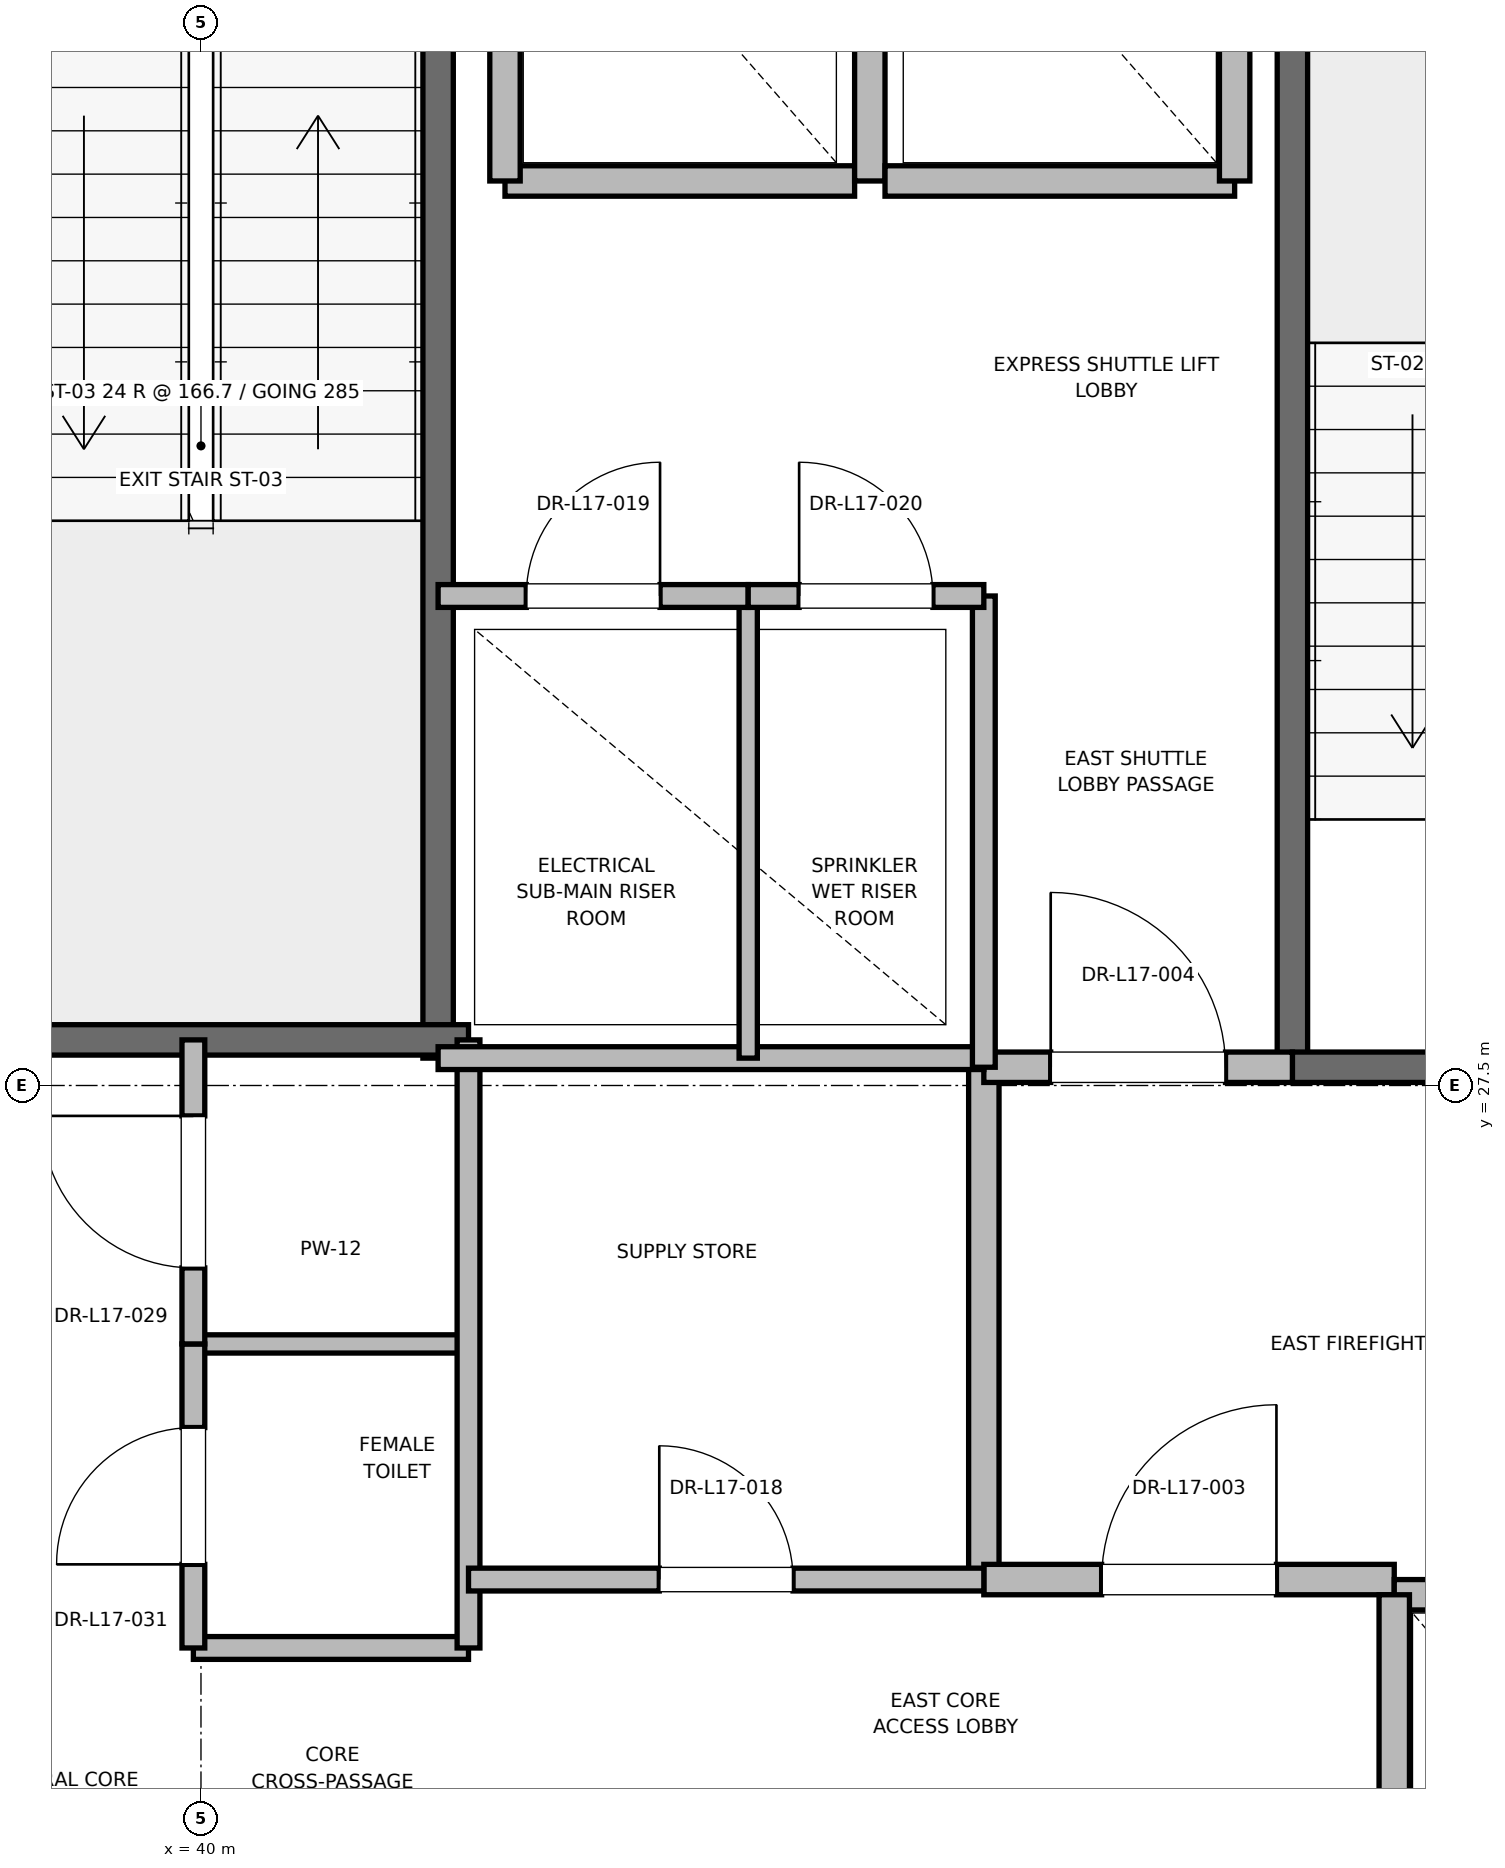
"""IFC4 building model, lengths in metres.
Left out: names, types, materials, properties, quantities, classifications, styles, units other than length and angle.
Written with IfcOpenShell. Run it as: python <this file> out.ifc"""

import sys

from ifc_helpers import new_model, si_unit, direction, frame, frame_2d, origin, place, context, subcontext, project, spatial, rectangle, extrude, element, fill, save


model = new_model("IFC4")
c1 = context("Model", 3, precision=1e-05, world=origin(), true_north=direction((0.0, 1.0)))
c2 = subcontext(c1, "Body", "Model", "MODEL_VIEW")
j1 = project(units=[si_unit("LENGTHUNIT", "METRE"), si_unit("PLANEANGLEUNIT", "RADIAN")], contexts=[c1])
p1 = place(None, origin())
s1 = spatial("IfcSite", under=j1, at=p1, CompositionType="ELEMENT")
p2 = place(p1, origin())
s2 = spatial("IfcBuilding", under=s1, at=p2, CompositionType="ELEMENT")
p3 = place(p2, frame((0.0, 0.0, 75.6)))
s3 = spatial("IfcBuildingStorey", under=s2, at=p3, CompositionType="ELEMENT", Elevation=75.6)
p4 = place(p3, frame((47.18, 27.62, 0.0), z_axis=(0.0, 0.0, 1.0), x_axis=(0.0, 1.0, 0.0)))
e1 = element("IfcWall", 1, at=p4, inside=s3, PredefinedType="SOLIDWALL", context=c2, shape_type="SweptSolid", body=[
    extrude(rectangle(XDim=8.18, YDim=0.2, at=frame_2d((4.09, 0.0))), origin(), (0.0, 0.0, 1.0), 3.76),
])
p5 = place(p3, frame((47.18, 27.62, 0.0), z_axis=(0.0, 0.0, 1.0), x_axis=(1.0, 0.0, 0.0)))
e2 = element("IfcWall", 2, at=p5, inside=s3, PredefinedType="SOLIDWALL", context=c2, shape_type="SweptSolid", body=[
    extrude(rectangle(XDim=3.12, YDim=0.2, at=frame_2d((1.56, 0.0))), origin(), (0.0, 0.0, 1.0), 3.76),
])
p6 = place(p5, frame((1.01, 0.0, 0.0)))
e3 = element("IfcOpeningElement", 3, at=p6, cuts=e2, PredefinedType="OPENING", context=c2, shape_type="SweptSolid", body=[
    extrude(rectangle(XDim=1.1, YDim=2.15, at=frame_2d((0.55, 1.075))), frame((0.0, 0.1, 0.0), z_axis=(0.0, -1.0, 0.0), x_axis=(1.0, 0.0, 0.0)), (0.0, 0.0, 1.0), 0.2),
])
p7 = place(p3, frame((41.56, 27.68, 0.0), z_axis=(0.0, 0.0, 1.0), x_axis=(0.0, 1.0, 0.0)))
e4 = element("IfcWall", 4, at=p7, inside=s3, PredefinedType="SOLIDWALL", context=c2, shape_type="SweptSolid", body=[
    extrude(rectangle(XDim=8.57, YDim=0.2, at=frame_2d((4.285, 0.0))), origin(), (0.0, 0.0, 1.0), 3.76),
])
p8 = place(p3, frame((38.44, 27.8, 0.0), z_axis=(0.0, 0.0, 1.0), x_axis=(1.0, 0.0, 0.0)))
e5 = element("IfcWall", 5, at=p8, inside=s3, PredefinedType="SOLIDWALL", context=c2, shape_type="SweptSolid", body=[
    extrude(rectangle(XDim=3.32, YDim=0.2, at=frame_2d((1.66, 0.0))), origin(), (0.0, 0.0, 1.0), 3.76),
])
p9 = place(p3, frame((45.15, 24.25, 0.0), z_axis=(0.0, 0.0, 1.0), x_axis=(0.0, 1.0, 0.0)))
e6 = element("IfcWall", 6, at=p9, inside=s3, PredefinedType="PARTITIONING", context=c2, shape_type="SweptSolid", body=[
    extrude(rectangle(XDim=3.37, YDim=0.2, at=frame_2d((1.685, 0.0))), origin(), (0.0, 0.0, 1.0), 3.76),
])
p10 = place(p3, frame((45.15, 24.25, 0.0), z_axis=(0.0, 0.0, 1.0), x_axis=(1.0, 0.0, 0.0)))
e7 = element("IfcWall", 7, at=p10, inside=s3, PredefinedType="PARTITIONING", context=c2, shape_type="SweptSolid", body=[
    extrude(rectangle(XDim=2.7, YDim=0.2, at=frame_2d((1.35, 0.0))), origin(), (0.0, 0.0, 1.0), 3.76),
])
p11 = place(p10, frame((0.775, 0.0, 0.0)))
e8 = element("IfcOpeningElement", 8, at=p11, cuts=e7, PredefinedType="OPENING", context=c2, shape_type="SweptSolid", body=[
    extrude(rectangle(XDim=1.15, YDim=2.2, at=frame_2d((0.575, 1.1))), frame((0.0, 0.1, 0.0), z_axis=(0.0, -1.0, 0.0), x_axis=(1.0, 0.0, 0.0)), (0.0, 0.0, 1.0), 0.2),
])
p12 = place(p3, frame((45.15, 27.62, 0.0), z_axis=(0.0, 0.0, 1.0), x_axis=(1.0, 0.0, 0.0)))
e9 = element("IfcWall", 9, at=p12, inside=s3, PredefinedType="PARTITIONING", context=c2, shape_type="SweptSolid", body=[
    extrude(rectangle(XDim=2.03, YDim=0.2, at=frame_2d((1.015, 0.0))), origin(), (0.0, 0.0, 1.0), 3.76),
])
p13 = place(p12, frame((0.44, 0.0, 0.0)))
e10 = element("IfcOpeningElement", 10, at=p13, cuts=e9, PredefinedType="OPENING", context=c2, shape_type="SweptSolid", body=[
    extrude(rectangle(XDim=1.15, YDim=2.2, at=frame_2d((0.575, 1.1))), frame((0.0, 0.1, 0.0), z_axis=(0.0, -1.0, 0.0), x_axis=(1.0, 0.0, 0.0)), (0.0, 0.0, 1.0), 0.2),
])
p14 = place(p3, frame((50.45, 24.15, 0.0), z_axis=(0.0, 0.0, 1.0), x_axis=(-1.0, 0.0, 0.0)))
e11 = element("IfcWall", 11, at=p14, inside=s3, PredefinedType="SOLIDWALL", context=c2, shape_type="SweptSolid", body=[
    extrude(rectangle(XDim=2.6, YDim=0.2, at=frame_2d((1.3, 0.0))), origin(), (0.0, 0.0, 1.0), 2.54),
])
p15 = place(p14, frame((0.75, 0.0, 0.0)))
e12 = element("IfcOpeningElement", 12, at=p15, cuts=e11, PredefinedType="OPENING", context=c2, shape_type="SweptSolid", body=[
    extrude(rectangle(XDim=1.1, YDim=2.2, at=frame_2d((0.55, 1.1))), frame((0.0, 0.1, 0.0), z_axis=(0.0, -1.0, 0.0), x_axis=(1.0, 0.0, 0.0)), (0.0, 0.0, 1.0), 0.2),
])
p16 = place(p3, frame((47.85, 24.15, 0.0), z_axis=(0.0, 0.0, 1.0), x_axis=(0.0, -1.0, 0.0)))
e13 = element("IfcWall", 13, at=p16, inside=s3, PredefinedType="SOLIDWALL", context=c2, shape_type="SweptSolid", body=[
    extrude(rectangle(XDim=3.0, YDim=0.2, at=frame_2d((1.5, 0.0))), origin(), (0.0, 0.0, 1.0), 3.76),
])
p17 = place(p3, frame((42.0, 33.45, 0.0), z_axis=(0.0, 0.0, 1.0), x_axis=(1.0, 0.0, 0.0)))
e14 = element("IfcWall", 14, at=p17, inside=s3, PredefinedType="SOLIDWALL", context=c2, shape_type="SweptSolid", body=[
    extrude(rectangle(XDim=2.3, YDim=0.2, at=frame_2d((1.15, 0.0))), origin(), (0.0, 0.0, 1.0), 3.76),
])
for number, where, z_axis, x_axis in (
    (15, (42.0, 36.05, 0.0), (0.0, 0.0, 1.0), (0.0, -1.0, 0.0)),
    (16, (44.4, 33.45, 0.0), (0.0, 0.0, 1.0), (0.0, 1.0, 0.0)),
):
    element("IfcWall", number, at=place(p3, frame(where, z_axis=z_axis, x_axis=x_axis)), inside=s3, PredefinedType="SOLIDWALL", context=c2, shape_type="SweptSolid", body=[
        extrude(rectangle(XDim=2.6, YDim=0.2, at=frame_2d((1.3, 0.0))), origin(), (0.0, 0.0, 1.0), 2.54),
    ])
p18 = place(p3, frame((44.5, 33.45, 0.0), z_axis=(0.0, 0.0, 1.0), x_axis=(1.0, 0.0, 0.0)))
e17 = element("IfcWall", 17, at=p18, inside=s3, PredefinedType="SOLIDWALL", context=c2, shape_type="SweptSolid", body=[
    extrude(rectangle(XDim=2.3, YDim=0.2, at=frame_2d((1.15, 0.0))), origin(), (0.0, 0.0, 1.0), 3.76),
])
p19 = place(p3, frame((46.8, 33.45, 0.0), z_axis=(0.0, 0.0, 1.0), x_axis=(0.0, 1.0, 0.0)))
e18 = element("IfcWall", 18, at=p19, inside=s3, PredefinedType="SOLIDWALL", context=c2, shape_type="SweptSolid", body=[
    extrude(rectangle(XDim=2.6, YDim=0.2, at=frame_2d((1.3, 0.0))), origin(), (0.0, 0.0, 1.0), 3.76),
])
p20 = place(p3, frame((39.95, 23.8, 0.0), z_axis=(0.0, 0.0, 1.0), x_axis=(1.0, 0.0, 0.0)))
e19 = element("IfcWall", 19, at=p20, inside=s3, PredefinedType="PARTITIONING", context=c2, shape_type="SweptSolid", body=[
    extrude(rectangle(XDim=1.81, YDim=0.15, at=frame_2d((0.905, 0.0))), origin(), (0.0, 0.0, 1.0), 2.85),
])
p21 = place(p3, frame((39.95, 25.8, 0.0), z_axis=(0.0, 0.0, 1.0), x_axis=(1.0, 0.0, 0.0)))
e20 = element("IfcWall", 20, at=p21, inside=s3, PredefinedType="PARTITIONING", context=c2, shape_type="SweptSolid", body=[
    extrude(rectangle(XDim=1.81, YDim=0.12, at=frame_2d((0.905, 0.0))), origin(), (0.0, 0.0, 1.0), 2.85),
])
p22 = place(p3, frame((41.76, 23.8, 0.0), z_axis=(0.0, 0.0, 1.0), x_axis=(0.0, 1.0, 0.0)))
e21 = element("IfcWall", 21, at=p22, inside=s3, PredefinedType="PARTITIONING", context=c2, shape_type="SweptSolid", body=[
    extrude(rectangle(XDim=4.0, YDim=0.15, at=frame_2d((2.0, 0.0))), origin(), (0.0, 0.0, 1.0), 2.85),
])
p23 = place(p3, frame((39.95, 23.8, 0.0), z_axis=(0.0, 0.0, 1.0), x_axis=(0.0, 1.0, 0.0)))
e22 = element("IfcWall", 22, at=p23, inside=s3, PredefinedType="PARTITIONING", context=c2, shape_type="SweptSolid", body=[
    extrude(rectangle(XDim=2.0, YDim=0.15, at=frame_2d((1.0, 0.0))), origin(), (0.0, 0.0, 1.0), 2.85),
])
p24 = place(p23, frame((0.55, 0.0, 0.0)))
e23 = element("IfcOpeningElement", 23, at=p24, cuts=e22, PredefinedType="OPENING", context=c2, shape_type="SweptSolid", body=[
    extrude(rectangle(XDim=0.9, YDim=2.1, at=frame_2d((0.45, 1.05))), frame((0.0, 0.075, 0.0), z_axis=(0.0, -1.0, 0.0), x_axis=(1.0, 0.0, 0.0)), (0.0, 0.0, 1.0), 0.15),
])
p25 = place(p3, frame((39.95, 25.8, 0.0), z_axis=(0.0, 0.0, 1.0), x_axis=(0.0, 1.0, 0.0)))
e24 = element("IfcWall", 24, at=p25, inside=s3, PredefinedType="PARTITIONING", context=c2, shape_type="SweptSolid", body=[
    extrude(rectangle(XDim=2.0, YDim=0.15, at=frame_2d((1.0, 0.0))), origin(), (0.0, 0.0, 1.0), 2.85),
])
p26 = place(p25, frame((0.5, 0.0, 0.0)))
e25 = element("IfcOpeningElement", 25, at=p26, cuts=e24, PredefinedType="OPENING", context=c2, shape_type="SweptSolid", body=[
    extrude(rectangle(XDim=1.0, YDim=2.15, at=frame_2d((0.5, 1.075))), frame((0.0, 0.075, 0.0), z_axis=(0.0, -1.0, 0.0), x_axis=(1.0, 0.0, 0.0)), (0.0, 0.0, 1.0), 0.15),
])
p27 = place(p3, frame((41.56, 27.68, 0.0), z_axis=(0.0, 0.0, 1.0), x_axis=(1.0, 0.0, 0.0)))
e26 = element("IfcWall", 26, at=p27, inside=s3, PredefinedType="PARTITIONING", context=c2, shape_type="SweptSolid", body=[
    extrude(rectangle(XDim=3.59, YDim=0.15, at=frame_2d((1.795, 0.0))), origin(), (0.0, 0.0, 1.0), 2.85),
])
p28 = place(p3, frame((41.76, 24.25, 0.0), z_axis=(0.0, 0.0, 1.0), x_axis=(1.0, 0.0, 0.0)))
e27 = element("IfcWall", 27, at=p28, inside=s3, PredefinedType="PARTITIONING", context=c2, shape_type="SweptSolid", body=[
    extrude(rectangle(XDim=3.39, YDim=0.15, at=frame_2d((1.695, 0.0))), origin(), (0.0, 0.0, 1.0), 2.85),
])
p29 = place(p28, frame((1.255, 0.0, 0.0)))
e28 = element("IfcOpeningElement", 28, at=p29, cuts=e27, PredefinedType="OPENING", context=c2, shape_type="SweptSolid", body=[
    extrude(rectangle(XDim=0.88, YDim=2.1, at=frame_2d((0.44, 1.05))), frame((0.0, 0.075, 0.0), z_axis=(0.0, -1.0, 0.0), x_axis=(1.0, 0.0, 0.0)), (0.0, 0.0, 1.0), 0.15),
])
p30 = place(p3, frame((45.15, 27.62, 0.0), z_axis=(0.0, 0.0, 1.0), x_axis=(0.0, 1.0, 0.0)))
e29 = element("IfcWall", 29, at=p30, inside=s3, PredefinedType="PARTITIONING", context=c2, shape_type="SweptSolid", body=[
    extrude(rectangle(XDim=3.1, YDim=0.15, at=frame_2d((1.55, 0.0))), origin(), (0.0, 0.0, 1.0), 2.85),
])
p31 = place(p3, frame((43.6, 27.68, 0.0), z_axis=(0.0, 0.0, 1.0), x_axis=(0.0, 1.0, 0.0)))
e30 = element("IfcWall", 30, at=p31, inside=s3, PredefinedType="PARTITIONING", context=c2, shape_type="SweptSolid", body=[
    extrude(rectangle(XDim=3.04, YDim=0.12, at=frame_2d((1.52, 0.0))), origin(), (0.0, 0.0, 1.0), 2.85),
])
p32 = place(p3, frame((41.56, 30.72, 0.0), z_axis=(0.0, 0.0, 1.0), x_axis=(1.0, 0.0, 0.0)))
e31 = element("IfcWall", 31, at=p32, inside=s3, PredefinedType="PARTITIONING", context=c2, shape_type="SweptSolid", body=[
    extrude(rectangle(XDim=2.04, YDim=0.15, at=frame_2d((1.02, 0.0))), origin(), (0.0, 0.0, 1.0), 2.85),
])
p33 = place(p32, frame((0.58, 0.0, 0.0)))
e32 = element("IfcOpeningElement", 32, at=p33, cuts=e31, PredefinedType="OPENING", context=c2, shape_type="SweptSolid", body=[
    extrude(rectangle(XDim=0.88, YDim=2.1, at=frame_2d((0.44, 1.05))), frame((0.0, 0.075, 0.0), z_axis=(0.0, -1.0, 0.0), x_axis=(1.0, 0.0, 0.0)), (0.0, 0.0, 1.0), 0.15),
])
p34 = place(p3, frame((43.6, 30.72, 0.0), z_axis=(0.0, 0.0, 1.0), x_axis=(1.0, 0.0, 0.0)))
e33 = element("IfcWall", 33, at=p34, inside=s3, PredefinedType="PARTITIONING", context=c2, shape_type="SweptSolid", body=[
    extrude(rectangle(XDim=1.55, YDim=0.15, at=frame_2d((0.775, 0.0))), origin(), (0.0, 0.0, 1.0), 2.85),
])
p35 = place(p34, frame((0.335, 0.0, 0.0)))
e34 = element("IfcOpeningElement", 34, at=p35, cuts=e33, PredefinedType="OPENING", context=c2, shape_type="SweptSolid", body=[
    extrude(rectangle(XDim=0.88, YDim=2.1, at=frame_2d((0.44, 1.05))), frame((0.0, 0.075, 0.0), z_axis=(0.0, -1.0, 0.0), x_axis=(1.0, 0.0, 0.0)), (0.0, 0.0, 1.0), 0.15),
])
p36 = place(p11, origin())
e35 = element("IfcDoor", 35, at=p36, inside=s3, OperationType="SINGLE_SWING_RIGHT", PredefinedType="DOOR", context=c2, shape_type="SweptSolid", body=[
    extrude(rectangle(XDim=1.15, YDim=2.2, at=frame_2d((0.575, 1.1))), frame((0.0, 0.025, 0.0), z_axis=(0.0, -1.0, 0.0), x_axis=(1.0, 0.0, 0.0)), (0.0, 0.0, 1.0), 0.05),
])
fill(e8, e35)
p37 = place(p13, origin())
e36 = element("IfcDoor", 36, at=p37, inside=s3, OperationType="SINGLE_SWING_LEFT", PredefinedType="DOOR", context=c2, shape_type="SweptSolid", body=[
    extrude(rectangle(XDim=1.15, YDim=2.2, at=frame_2d((0.575, 1.1))), frame((0.0, 0.025, 0.0), z_axis=(0.0, -1.0, 0.0), x_axis=(1.0, 0.0, 0.0)), (0.0, 0.0, 1.0), 0.05),
])
fill(e10, e36)
p38 = place(p24, origin())
e37 = element("IfcDoor", 37, at=p38, inside=s3, OperationType="SINGLE_SWING_LEFT", PredefinedType="DOOR", context=c2, shape_type="SweptSolid", body=[
    extrude(rectangle(XDim=0.9, YDim=2.1, at=frame_2d((0.45, 1.05))), frame((0.0, 0.025, 0.0), z_axis=(0.0, -1.0, 0.0), x_axis=(1.0, 0.0, 0.0)), (0.0, 0.0, 1.0), 0.05),
])
fill(e23, e37)
p39 = place(p26, origin())
e38 = element("IfcDoor", 38, at=p39, inside=s3, OperationType="SINGLE_SWING_RIGHT", PredefinedType="DOOR", context=c2, shape_type="SweptSolid", body=[
    extrude(rectangle(XDim=1.0, YDim=2.15, at=frame_2d((0.5, 1.075))), frame((0.0, 0.025, 0.0), z_axis=(0.0, -1.0, 0.0), x_axis=(1.0, 0.0, 0.0)), (0.0, 0.0, 1.0), 0.05),
])
fill(e25, e38)
p40 = place(p29, origin())
e39 = element("IfcDoor", 39, at=p40, inside=s3, OperationType="SINGLE_SWING_LEFT", PredefinedType="DOOR", context=c2, shape_type="SweptSolid", body=[
    extrude(rectangle(XDim=0.88, YDim=2.1, at=frame_2d((0.44, 1.05))), frame((0.0, 0.025, 0.0), z_axis=(0.0, -1.0, 0.0), x_axis=(1.0, 0.0, 0.0)), (0.0, 0.0, 1.0), 0.05),
])
fill(e28, e39)
p41 = place(p33, origin())
e40 = element("IfcDoor", 40, at=p41, inside=s3, OperationType="SINGLE_SWING_RIGHT", PredefinedType="DOOR", context=c2, shape_type="SweptSolid", body=[
    extrude(rectangle(XDim=0.88, YDim=2.1, at=frame_2d((0.44, 1.05))), frame((0.0, 0.025, 0.0), z_axis=(0.0, -1.0, 0.0), x_axis=(1.0, 0.0, 0.0)), (0.0, 0.0, 1.0), 0.05),
])
fill(e32, e40)
p42 = place(p35, origin())
e41 = element("IfcDoor", 41, at=p42, inside=s3, OperationType="SINGLE_SWING_LEFT", PredefinedType="DOOR", context=c2, shape_type="SweptSolid", body=[
    extrude(rectangle(XDim=0.88, YDim=2.1, at=frame_2d((0.44, 1.05))), frame((0.0, 0.025, 0.0), z_axis=(0.0, -1.0, 0.0), x_axis=(1.0, 0.0, 0.0)), (0.0, 0.0, 1.0), 0.05),
])
fill(e34, e41)
save(model, sys.argv[1])
